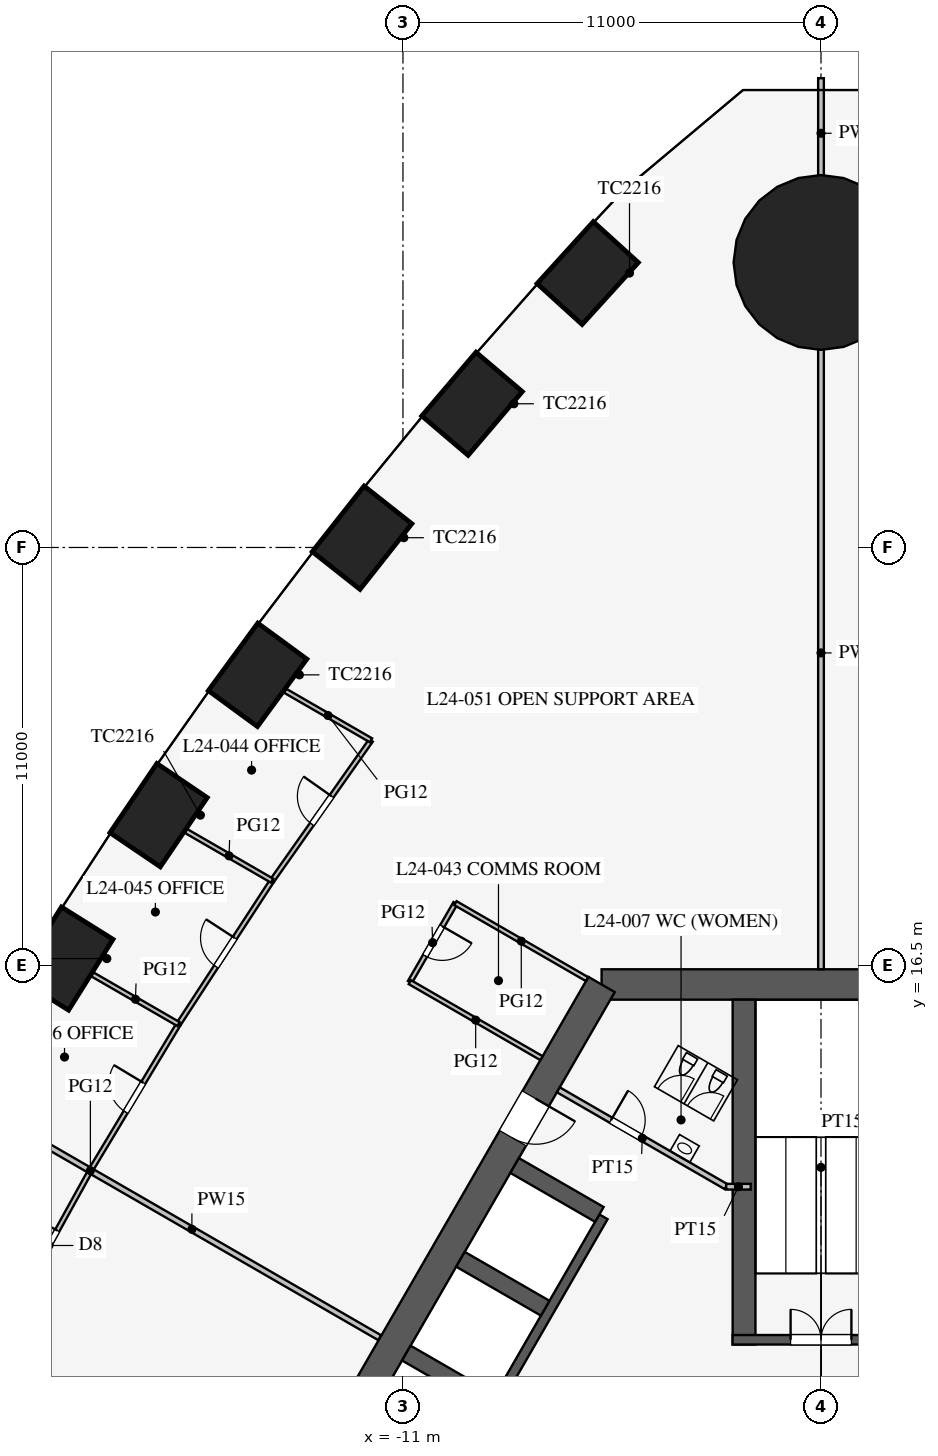
"""IFC4 building model, lengths in metres.
Left out: names, types, materials, properties, quantities, classifications, styles, units other than length and angle.
Written with IfcOpenShell. Run it as: python <this file> out.ifc"""

import sys

from ifc_helpers import new_model, si_unit, direction, frame, frame_2d, origin, origin_2d, place, context, subcontext, project, spatial, rectangle, circle, extrude, element, fill, save


model = new_model("IFC4")
c1 = context("Model", 3, precision=1e-05, world=origin(), true_north=direction((0.0, 1.0)))
c2 = subcontext(c1, "Body", "Model", "MODEL_VIEW")
j1 = project(units=[si_unit("LENGTHUNIT", "METRE"), si_unit("PLANEANGLEUNIT", "RADIAN")], contexts=[c1])
p1 = place(None, origin())
s1 = spatial("IfcSite", under=j1, at=p1, CompositionType="ELEMENT")
p2 = place(p1, origin())
s2 = spatial("IfcBuilding", under=s1, at=p2, CompositionType="ELEMENT")
p3 = place(p2, frame((0.0, 0.0, 107.3)))
s3 = spatial("IfcBuildingStorey", under=s2, at=p3, CompositionType="ELEMENT", Elevation=107.3)
for number, where, z_axis, x_axis in (
    (1, (-6.139, 34.721, 0.0), (0.0, 0.0, 1.0), (-0.672, -0.74, 0.0)),
    (2, (-9.182, 31.282, 0.0), (0.0, 0.0, 1.0), (-0.648, -0.762, 0.0)),
    (3, (-12.077, 27.757, 0.0), (0.0, 0.0, 1.0), (-0.62, -0.785, 0.0)),
    (4, (-14.825, 24.148, 0.0), (0.0, 0.0, 1.0), (-0.591, -0.807, 0.0)),
    (5, (-17.43, 20.456, 0.0), (0.0, 0.0, 1.0), (-0.561, -0.828, 0.0)),
    (6, (-19.893, 16.681, 0.0), (0.0, 0.0, 1.0), (-0.531, -0.847, 0.0)),
):
    element("IfcColumn", number, at=place(p3, frame(where, z_axis=z_axis, x_axis=x_axis)), inside=s3, PredefinedType="COLUMN", context=c2, shape_type="SweptSolid", body=[
        extrude(rectangle(XDim=2.2, YDim=1.6, at=origin_2d()), origin(), (0.0, 0.0, 1.0), 4.2),
    ])
p4 = place(p3, frame((0.0, 35.0, 0.0), z_axis=(0.0, 0.0, 1.0), x_axis=(1.0, 0.0, 0.0)))
e7 = element("IfcColumn", 7, at=p4, inside=s3, PredefinedType="COLUMN", context=c2, shape_type="SweptSolid", body=[
    extrude(circle(Radius=2.3, at=origin_2d()), origin(), (0.0, 0.0, 1.0), 4.2),
])
p5 = place(p3, frame((5.773, 16.0, 0.0), z_axis=(0.0, 0.0, 1.0), x_axis=(-1.0, 0.0, 0.0)))
e8 = element("IfcWall", 8, at=p5, inside=s3, PredefinedType="SHEAR", context=c2, shape_type="SweptSolid", body=[
    extrude(rectangle(XDim=11.547, YDim=0.8, at=frame_2d((5.773, 0.0))), origin(), (0.0, 0.0, 1.0), 4.2),
])
p6 = place(p3, frame((-5.773, 16.0, 0.0), z_axis=(0.0, 0.0, 1.0), x_axis=(-0.500002442456, -0.866023993627, 0.0)))
e9 = element("IfcWall", 9, at=p6, inside=s3, PredefinedType="SHEAR", context=c2, shape_type="SweptSolid", body=[
    extrude(rectangle(XDim=21.939, YDim=0.8, at=frame_2d((10.97, 0.0))), origin(), (0.0, 0.0, 1.0), 4.2),
])
p7 = place(p6, frame((17.27, 0.0, 0.0)))
e10 = element("IfcOpeningElement", 10, at=p7, cuts=e9, PredefinedType="OPENING", context=c2, shape_type="SweptSolid", body=[
    extrude(rectangle(XDim=1.2, YDim=2.1, at=frame_2d((0.6, 1.05))), frame((0.0, 0.41, 0.0), z_axis=(0.0, -1.0, 0.0), x_axis=(1.0, 0.0, 0.0)), (0.0, 0.0, 1.0), 0.82),
])
p8 = place(p6, frame((3.47, 0.0, 0.0)))
e11 = element("IfcOpeningElement", 11, at=p8, cuts=e9, PredefinedType="OPENING", context=c2, shape_type="SweptSolid", body=[
    extrude(rectangle(XDim=1.2, YDim=2.1, at=frame_2d((0.6, 1.05))), frame((0.0, 0.41, 0.0), z_axis=(0.0, -1.0, 0.0), x_axis=(1.0, 0.0, 0.0)), (0.0, 0.0, 1.0), 0.82),
])
p9 = place(p3, frame((-5.724, 9.886, 0.0), z_axis=(0.0, 0.0, 1.0), x_axis=(-0.500001763848, -0.866024385424, 0.0)))
e12 = element("IfcWall", 12, at=p9, inside=s3, PredefinedType="SHEAR", context=c2, shape_type="SweptSolid", body=[
    extrude(rectangle(XDim=11.4, YDim=0.25, at=frame_2d((5.7, 0.0))), origin(), (0.0, 0.0, 1.0), 4.2),
])
p10 = place(p9, frame((6.525, 0.0, 0.0)))
e13 = element("IfcOpeningElement", 13, at=p10, cuts=e12, PredefinedType="OPENING", context=c2, shape_type="SweptSolid", body=[
    extrude(rectangle(XDim=1.2, YDim=2.2, at=frame_2d((0.6, 1.1))), frame((0.0, 0.135, 0.0), z_axis=(0.0, -1.0, 0.0), x_axis=(1.0, 0.0, 0.0)), (0.0, 0.0, 1.0), 0.27),
])
p11 = place(p9, frame((9.375, 0.0, 0.0)))
e14 = element("IfcOpeningElement", 14, at=p11, cuts=e12, PredefinedType="OPENING", context=c2, shape_type="SweptSolid", body=[
    extrude(rectangle(XDim=1.2, YDim=2.2, at=frame_2d((0.6, 1.1))), frame((0.0, 0.135, 0.0), z_axis=(0.0, -1.0, 0.0), x_axis=(1.0, 0.0, 0.0)), (0.0, 0.0, 1.0), 0.27),
])
p12 = place(p3, frame((-5.832, 9.949, 0.0), z_axis=(0.0, 0.0, 1.0), x_axis=(-0.866029291668, 0.499993265928, 0.0)))
e15 = element("IfcWall", 15, at=p12, inside=s3, PredefinedType="SHEAR", context=c2, shape_type="SweptSolid", body=[
    extrude(rectangle(XDim=2.575, YDim=0.45, at=frame_2d((1.288, 0.0))), origin(), (0.0, 0.0, 1.0), 4.2),
])
for number, where, z_axis, x_axis in (
    (16, (-7.257, 7.481, 0.0), (0.0, 0.0, 1.0), (-0.866, 0.5, 0.0)),
    (17, (-8.682, 5.012, 0.0), (0.0, 0.0, 1.0), (-0.866, 0.5, 0.0)),
):
    element("IfcWall", number, at=place(p3, frame(where, z_axis=z_axis, x_axis=x_axis)), inside=s3, PredefinedType="SHEAR", context=c2, shape_type="SweptSolid", body=[
        extrude(rectangle(XDim=2.575, YDim=0.45, at=frame_2d((1.288, 0.0))), origin(), (0.0, 0.0, 1.0), 4.2),
    ])
p13 = place(p3, frame((-2.025, 6.525, 0.0), z_axis=(0.0, 0.0, 1.0), x_axis=(0.0, 1.0, 0.0)))
e18 = element("IfcWall", 18, at=p13, inside=s3, PredefinedType="SHEAR", context=c2, shape_type="SweptSolid", body=[
    extrude(rectangle(XDim=9.075, YDim=0.6, at=frame_2d((4.538, 0.0))), origin(), (0.0, 0.0, 1.0), 4.2),
])
p14 = place(p3, frame((2.325, 6.65, 0.0), z_axis=(0.0, 0.0, 1.0), x_axis=(-1.0, 0.0, 0.0)))
e19 = element("IfcWall", 19, at=p14, inside=s3, PredefinedType="SHEAR", context=c2, shape_type="SweptSolid", body=[
    extrude(rectangle(XDim=4.65, YDim=0.25, at=frame_2d((2.325, 0.0))), origin(), (0.0, 0.0, 1.0), 4.2),
])
p15 = place(p14, frame((1.525, 0.0, 0.0)))
e20 = element("IfcOpeningElement", 20, at=p15, cuts=e19, PredefinedType="OPENING", context=c2, shape_type="SweptSolid", body=[
    extrude(rectangle(XDim=1.6, YDim=2.1, at=frame_2d((0.8, 1.05))), frame((0.0, 0.135, 0.0), z_axis=(0.0, -1.0, 0.0), x_axis=(1.0, 0.0, 0.0)), (0.0, 0.0, 1.0), 0.27),
])
p16 = place(p3, frame((-2.495, 10.678, 0.0), z_axis=(0.0, 0.0, 1.0), x_axis=(-0.86602216432, 0.500005610874, 0.0)))
e21 = element("IfcWall", 21, at=p16, inside=s3, PredefinedType="PARTITIONING", context=c2, shape_type="SweptSolid", body=[
    extrude(rectangle(XDim=5.1, YDim=0.15, at=frame_2d((2.55, 0.0))), origin(), (0.0, 0.0, 1.0), 4.0),
])
p17 = place(p16, frame((2.6, 0.0, 0.0)))
e22 = element("IfcOpeningElement", 22, at=p17, cuts=e21, PredefinedType="OPENING", context=c2, shape_type="SweptSolid", body=[
    extrude(rectangle(XDim=0.9, YDim=2.1, at=frame_2d((0.45, 1.05))), frame((0.0, 0.085, 0.0), z_axis=(0.0, -1.0, 0.0), x_axis=(1.0, 0.0, 0.0)), (0.0, 0.0, 1.0), 0.17),
])
p18 = place(p3, frame((-2.495, 10.678, 0.0), z_axis=(0.0, 0.0, 1.0), x_axis=(1.0, 0.0, 0.0)))
e23 = element("IfcWall", 23, at=p18, inside=s3, PredefinedType="PARTITIONING", context=c2, shape_type="SweptSolid", body=[
    extrude(rectangle(XDim=0.645, YDim=0.15, at=frame_2d((0.323, 0.0))), origin(), (0.0, 0.0, 1.0), 4.0),
])
p19 = place(p3, frame((0.0, 16.4, 0.0), z_axis=(0.0, 0.0, 1.0), x_axis=(0.0, 1.0, 0.0)))
e24 = element("IfcWall", 24, at=p19, inside=s3, PredefinedType="PARTITIONING", context=c2, shape_type="SweptSolid", body=[
    extrude(rectangle(XDim=16.65, YDim=0.15, at=frame_2d((8.325, 0.0))), origin(), (0.0, 0.0, 1.0), 2.3),
])
p20 = place(p3, frame((0.0, 36.95, 0.0), z_axis=(0.0, 0.0, 1.0), x_axis=(0.0, 1.0, 0.0)))
e25 = element("IfcWall", 25, at=p20, inside=s3, PredefinedType="PARTITIONING", context=c2, shape_type="SweptSolid", body=[
    extrude(rectangle(XDim=2.899, YDim=0.15, at=frame_2d((1.45, 0.0))), origin(), (0.0, 0.0, 1.0), 2.3),
])
p21 = place(p3, frame((-11.613, 6.705, 0.0), z_axis=(0.0, 0.0, 1.0), x_axis=(-0.866026306654, 0.499998436182, 0.0)))
e26 = element("IfcWall", 26, at=p21, inside=s3, PredefinedType="PARTITIONING", context=c2, shape_type="SweptSolid", body=[
    extrude(rectangle(XDim=11.41, YDim=0.15, at=frame_2d((5.705, 0.0))), origin(), (0.0, 0.0, 1.0), 2.8),
])
p22 = place(p3, frame((-9.619, 18.14, 0.0), z_axis=(0.0, 0.0, 1.0), x_axis=(-0.500001309137, -0.866024647952, 0.0)))
e27 = element("IfcWall", 27, at=p22, inside=s3, PredefinedType="PARTITIONING", context=c2, shape_type="SweptSolid", body=[
    extrude(rectangle(XDim=2.4, YDim=0.12, at=frame_2d((1.2, 0.0))), origin(), (0.0, 0.0, 1.0), 2.9),
])
p23 = place(p22, frame((0.7, 0.0, 0.15)))
e28 = element("IfcOpeningElement", 28, at=p23, cuts=e27, PredefinedType="OPENING", context=c2, shape_type="SweptSolid", body=[
    extrude(rectangle(XDim=0.9, YDim=2.1, at=frame_2d((0.45, 1.05))), frame((0.0, 0.07, 0.0), z_axis=(0.0, -1.0, 0.0), x_axis=(1.0, 0.0, 0.0)), (0.0, 0.0, 1.0), 0.14),
])
for number, where, z_axis, x_axis in (
    (29, (-6.155, 16.14, 0.0), (0.0, 0.0, 1.0), (-0.866, 0.5, 0.0)),
    (30, (-7.355, 14.061, 0.0), (0.0, 0.0, 1.0), (-0.866, 0.5, 0.0)),
):
    element("IfcWall", number, at=place(p3, frame(where, z_axis=z_axis, x_axis=x_axis)), inside=s3, PredefinedType="PARTITIONING", context=c2, shape_type="SweptSolid", body=[
        extrude(rectangle(XDim=4.0, YDim=0.12, at=frame_2d((2.0, 0.0))), origin(), (0.0, 0.0, 1.0), 2.9),
    ])
p24 = place(p3, frame((-19.226, 11.1, 0.0), z_axis=(0.0, 0.0, 1.0), x_axis=(-0.484292898211, -0.874905931368, 0.0)))
e31 = element("IfcWall", 31, at=p24, inside=s3, PredefinedType="PARTITIONING", context=c2, shape_type="SweptSolid", body=[
    extrude(rectangle(XDim=4.501, YDim=0.12, at=frame_2d((2.25, 0.0))), origin(), (0.0, 0.0, 1.0), 2.9),
])
p25 = place(p24, frame((1.8, 0.0, 0.15)))
e32 = element("IfcOpeningElement", 32, at=p25, cuts=e31, PredefinedType="OPENING", context=c2, shape_type="SweptSolid", body=[
    extrude(rectangle(XDim=0.9, YDim=2.1, at=frame_2d((0.45, 1.05))), frame((0.0, 0.07, 0.0), z_axis=(0.0, -1.0, 0.0), x_axis=(1.0, 0.0, 0.0)), (0.0, 0.0, 1.0), 0.14),
])
p26 = place(p3, frame((-11.842, 22.425, 0.0), z_axis=(0.0, 0.0, 1.0), x_axis=(-0.576023283708, -0.817433285734, 0.0)))
e33 = element("IfcWall", 33, at=p26, inside=s3, PredefinedType="PARTITIONING", context=c2, shape_type="SweptSolid", body=[
    extrude(rectangle(XDim=4.519, YDim=0.12, at=frame_2d((2.259, 0.0))), origin(), (0.0, 0.0, 1.0), 2.9),
])
p27 = place(p26, frame((1.8, 0.0, 0.15)))
e34 = element("IfcOpeningElement", 34, at=p27, cuts=e33, PredefinedType="OPENING", context=c2, shape_type="SweptSolid", body=[
    extrude(rectangle(XDim=0.9, YDim=2.1, at=frame_2d((0.45, 1.05))), frame((0.0, 0.07, 0.0), z_axis=(0.0, -1.0, 0.0), x_axis=(1.0, 0.0, 0.0)), (0.0, 0.0, 1.0), 0.14),
])
p28 = place(p3, frame((-16.905, 14.956, 0.0), z_axis=(0.0, 0.0, 1.0), x_axis=(-0.515548366618, -0.856860479703, 0.0)))
e35 = element("IfcWall", 35, at=p28, inside=s3, PredefinedType="PARTITIONING", context=c2, shape_type="SweptSolid", body=[
    extrude(rectangle(XDim=4.501, YDim=0.12, at=frame_2d((2.25, 0.0))), origin(), (0.0, 0.0, 1.0), 2.9),
])
p29 = place(p28, frame((1.8, 0.0, 0.15)))
e36 = element("IfcOpeningElement", 36, at=p29, cuts=e35, PredefinedType="OPENING", context=c2, shape_type="SweptSolid", body=[
    extrude(rectangle(XDim=0.9, YDim=2.1, at=frame_2d((0.45, 1.05))), frame((0.0, 0.07, 0.0), z_axis=(0.0, -1.0, 0.0), x_axis=(1.0, 0.0, 0.0)), (0.0, 0.0, 1.0), 0.14),
])
p30 = place(p3, frame((-14.444, 18.732, 0.0), z_axis=(0.0, 0.0, 1.0), x_axis=(-0.546069464151, -0.837739900161, 0.0)))
e37 = element("IfcWall", 37, at=p30, inside=s3, PredefinedType="PARTITIONING", context=c2, shape_type="SweptSolid", body=[
    extrude(rectangle(XDim=4.507, YDim=0.12, at=frame_2d((2.253, 0.0))), origin(), (0.0, 0.0, 1.0), 2.9),
])
p31 = place(p30, frame((1.8, 0.0, 0.15)))
e38 = element("IfcOpeningElement", 38, at=p31, cuts=e37, PredefinedType="OPENING", context=c2, shape_type="SweptSolid", body=[
    extrude(rectangle(XDim=0.9, YDim=2.1, at=frame_2d((0.45, 1.05))), frame((0.0, 0.07, 0.0), z_axis=(0.0, -1.0, 0.0), x_axis=(1.0, 0.0, 0.0)), (0.0, 0.0, 1.0), 0.14),
])
p32 = place(p3, frame((-11.842, 22.425, 0.0), z_axis=(0.0, 0.0, 1.0), x_axis=(-0.866036074319, 0.499981517636, 0.0)))
e39 = element("IfcWall", 39, at=p32, inside=s3, PredefinedType="PARTITIONING", context=c2, shape_type="SweptSolid", body=[
    extrude(rectangle(XDim=2.61, YDim=0.12, at=frame_2d((1.305, 0.0))), origin(), (0.0, 0.0, 1.0), 2.6),
])
p33 = place(p3, frame((-16.905, 14.956, 0.0), z_axis=(0.0, 0.0, 1.0), x_axis=(-0.866008611403, 0.50002908413, 0.0)))
e40 = element("IfcWall", 40, at=p33, inside=s3, PredefinedType="PARTITIONING", context=c2, shape_type="SweptSolid", body=[
    extrude(rectangle(XDim=2.619, YDim=0.12, at=frame_2d((1.31, 0.0))), origin(), (0.0, 0.0, 1.0), 2.8),
])
p34 = place(p3, frame((-14.444, 18.732, 0.0), z_axis=(0.0, 0.0, 1.0), x_axis=(-0.866011491631, 0.500024095782, 0.0)))
e41 = element("IfcWall", 41, at=p34, inside=s3, PredefinedType="PARTITIONING", context=c2, shape_type="SweptSolid", body=[
    extrude(rectangle(XDim=2.615, YDim=0.12, at=frame_2d((1.308, 0.0))), origin(), (0.0, 0.0, 1.0), 2.9),
])
p35 = place(p17, frame((0.9, 0.0, 0.0), z_axis=(0.0, 0.0, 1.0), x_axis=(-1.0, 0.0, 0.0)))
e42 = element("IfcDoor", 42, at=p35, inside=s3, OperationType="SINGLE_SWING_LEFT", PredefinedType="DOOR", context=c2, shape_type="SweptSolid", body=[
    extrude(rectangle(XDim=0.9, YDim=2.1, at=frame_2d((0.45, 1.05))), frame((0.0, 0.025, 0.0), z_axis=(0.0, -1.0, 0.0), x_axis=(1.0, 0.0, 0.0)), (0.0, 0.0, 1.0), 0.05),
])
fill(e22, e42)
p36 = place(p15, frame((1.6, 0.0, 0.0), z_axis=(0.0, 0.0, 1.0), x_axis=(-1.0, 0.0, 0.0)))
e43 = element("IfcDoor", 43, at=p36, inside=s3, OperationType="DOUBLE_DOOR_SINGLE_SWING", PredefinedType="DOOR", context=c2, shape_type="SweptSolid", body=[
    extrude(rectangle(XDim=1.6, YDim=2.1, at=frame_2d((0.8, 1.05))), frame((0.0, 0.025, 0.0), z_axis=(0.0, -1.0, 0.0), x_axis=(1.0, 0.0, 0.0)), (0.0, 0.0, 1.0), 0.05),
])
fill(e20, e43)
p37 = place(p8, origin())
e44 = element("IfcDoor", 44, at=p37, inside=s3, OperationType="SINGLE_SWING_LEFT", PredefinedType="DOOR", context=c2, shape_type="SweptSolid", body=[
    extrude(rectangle(XDim=1.2, YDim=2.1, at=frame_2d((0.6, 1.05))), frame((0.0, 0.025, 0.0), z_axis=(0.0, -1.0, 0.0), x_axis=(1.0, 0.0, 0.0)), (0.0, 0.0, 1.0), 0.05),
])
fill(e11, e44)
p38 = place(p23, origin())
e45 = element("IfcDoor", 45, at=p38, inside=s3, OperationType="SINGLE_SWING_LEFT", PredefinedType="DOOR", context=c2, shape_type="SweptSolid", body=[
    extrude(rectangle(XDim=0.9, YDim=2.1, at=frame_2d((0.45, 1.05))), frame((0.0, 0.025, 0.0), z_axis=(0.0, -1.0, 0.0), x_axis=(1.0, 0.0, 0.0)), (0.0, 0.0, 1.0), 0.05),
])
fill(e28, e45)
p39 = place(p27, frame((0.9, 0.0, 0.0), z_axis=(0.0, 0.0, 1.0), x_axis=(-1.0, 0.0, 0.0)))
e46 = element("IfcDoor", 46, at=p39, inside=s3, OperationType="SINGLE_SWING_RIGHT", PredefinedType="DOOR", context=c2, shape_type="SweptSolid", body=[
    extrude(rectangle(XDim=0.9, YDim=2.1, at=frame_2d((0.45, 1.05))), frame((0.0, 0.025, 0.0), z_axis=(0.0, -1.0, 0.0), x_axis=(1.0, 0.0, 0.0)), (0.0, 0.0, 1.0), 0.05),
])
fill(e34, e46)
p40 = place(p31, frame((0.9, 0.0, 0.0), z_axis=(0.0, 0.0, 1.0), x_axis=(-1.0, 0.0, 0.0)))
e47 = element("IfcDoor", 47, at=p40, inside=s3, OperationType="SINGLE_SWING_RIGHT", PredefinedType="DOOR", context=c2, shape_type="SweptSolid", body=[
    extrude(rectangle(XDim=0.9, YDim=2.1, at=frame_2d((0.45, 1.05))), frame((0.0, 0.025, 0.0), z_axis=(0.0, -1.0, 0.0), x_axis=(1.0, 0.0, 0.0)), (0.0, 0.0, 1.0), 0.05),
])
fill(e38, e47)
p41 = place(p29, frame((0.9, 0.0, 0.0), z_axis=(0.0, 0.0, 1.0), x_axis=(-1.0, 0.0, 0.0)))
e48 = element("IfcDoor", 48, at=p41, inside=s3, OperationType="SINGLE_SWING_RIGHT", PredefinedType="DOOR", context=c2, shape_type="SweptSolid", body=[
    extrude(rectangle(XDim=0.9, YDim=2.1, at=frame_2d((0.45, 1.05))), frame((0.0, 0.025, 0.0), z_axis=(0.0, -1.0, 0.0), x_axis=(1.0, 0.0, 0.0)), (0.0, 0.0, 1.0), 0.05),
])
fill(e36, e48)
p42 = place(p25, frame((0.9, 0.0, 0.0), z_axis=(0.0, 0.0, 1.0), x_axis=(-1.0, 0.0, 0.0)))
e49 = element("IfcDoor", 49, at=p42, inside=s3, OperationType="SINGLE_SWING_RIGHT", PredefinedType="DOOR", context=c2, shape_type="SweptSolid", body=[
    extrude(rectangle(XDim=0.9, YDim=2.1, at=frame_2d((0.45, 1.05))), frame((0.0, 0.025, 0.0), z_axis=(0.0, -1.0, 0.0), x_axis=(1.0, 0.0, 0.0)), (0.0, 0.0, 1.0), 0.05),
])
fill(e32, e49)
save(model, sys.argv[1])
